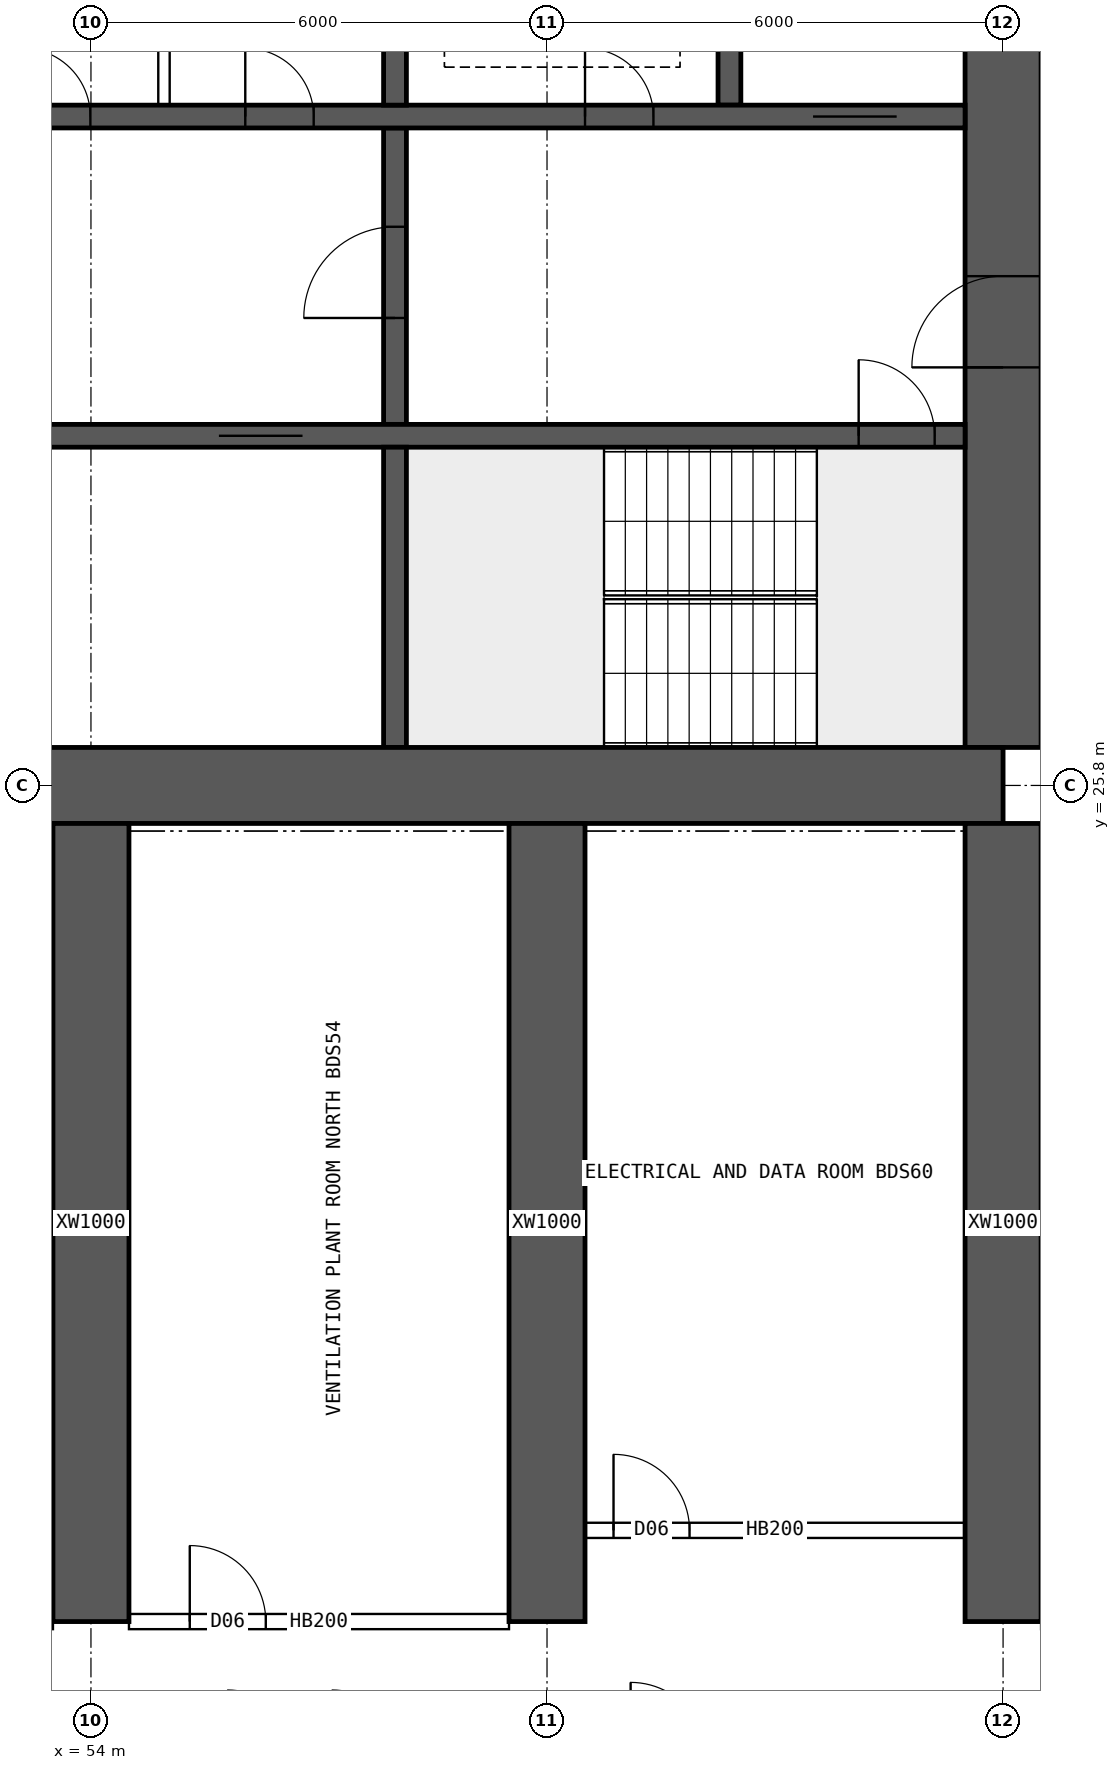
"""IFC4 building model, lengths in metres.
Left out: names, types, materials, properties, quantities, classifications, styles, units other than length and angle.
Written with IfcOpenShell. Run it as: python <this file> out.ifc"""

import sys

from ifc_helpers import new_model, si_unit, direction, frame, frame_2d, origin, place, context, subcontext, project, spatial, rectangle, extrude, element, fill, save


model = new_model("IFC4")
c1 = context("Model", 3, precision=1e-05, world=origin(), true_north=direction((0.0, 1.0)))
c2 = subcontext(c1, "Body", "Model", "MODEL_VIEW")
j1 = project(units=[si_unit("LENGTHUNIT", "METRE"), si_unit("PLANEANGLEUNIT", "RADIAN")], contexts=[c1])
p1 = place(None, origin())
s1 = spatial("IfcSite", under=j1, at=p1, CompositionType="ELEMENT")
p2 = place(p1, origin())
s2 = spatial("IfcBuilding", under=s1, at=p2, CompositionType="ELEMENT")
p3 = place(p2, frame((0.0, 0.0, 46.45)))
s3 = spatial("IfcBuildingStorey", under=s2, at=p3, CompositionType="ELEMENT", Elevation=46.45)
p4 = place(p3, frame((18.0, 25.8, 0.0), z_axis=(0.0, 0.0, 1.0), x_axis=(1.0, 0.0, 0.0)))
e1 = element("IfcWall", 1, at=p4, inside=s3, PredefinedType="SHEAR", context=c2, shape_type="SweptSolid", body=[
    extrude(rectangle(XDim=48.0, YDim=1.0, at=frame_2d((24.0, 0.0))), origin(), (0.0, 0.0, 1.0), 3.75),
])
p5 = place(p3, frame((66.0, 26.3, 0.0), z_axis=(0.0, 0.0, 1.0), x_axis=(0.0, 1.0, 0.0)))
e2 = element("IfcWall", 2, at=p5, inside=s3, PredefinedType="SHEAR", context=c2, shape_type="SweptSolid", body=[
    extrude(rectangle(XDim=11.4, YDim=1.0, at=frame_2d((5.7, 0.0))), origin(), (0.0, 0.0, 1.0), 3.75),
])
p6 = place(p5, frame((5.0, 0.0, 0.0)))
e3 = element("IfcOpeningElement", 3, at=p6, cuts=e2, PredefinedType="OPENING", context=c2, shape_type="SweptSolid", body=[
    extrude(rectangle(XDim=1.2, YDim=2.1, at=frame_2d((0.6, 1.05))), frame((0.0, 0.51, 0.0), z_axis=(0.0, -1.0, 0.0), x_axis=(1.0, 0.0, 0.0)), (0.0, 0.0, 1.0), 1.02),
])
p7 = place(p3, frame((18.5, 30.4, 0.0), z_axis=(0.0, 0.0, 1.0), x_axis=(1.0, 0.0, 0.0)))
e4 = element("IfcWall", 4, at=p7, inside=s3, PredefinedType="SHEAR", context=c2, shape_type="SweptSolid", body=[
    extrude(rectangle(XDim=47.0, YDim=0.3, at=frame_2d((23.5, 0.0))), origin(), (0.0, 0.0, 1.0), 3.75),
])
p8 = place(p7, frame((0.4, 0.0, 0.0)))
e5 = element("IfcOpeningElement", 5, at=p8, cuts=e4, PredefinedType="OPENING", context=c2, shape_type="SweptSolid", body=[
    extrude(rectangle(XDim=1.0, YDim=2.1, at=frame_2d((0.5, 1.05))), frame((0.0, 0.16, 0.0), z_axis=(0.0, -1.0, 0.0), x_axis=(1.0, 0.0, 0.0)), (0.0, 0.0, 1.0), 0.32),
])
p9 = place(p7, frame((45.6, 0.0, 0.0)))
e6 = element("IfcOpeningElement", 6, at=p9, cuts=e4, PredefinedType="OPENING", context=c2, shape_type="SweptSolid", body=[
    extrude(rectangle(XDim=1.0, YDim=2.1, at=frame_2d((0.5, 1.05))), frame((0.0, 0.16, 0.0), z_axis=(0.0, -1.0, 0.0), x_axis=(1.0, 0.0, 0.0)), (0.0, 0.0, 1.0), 0.32),
])
p10 = place(p7, frame((8.25, 0.0, 0.0)))
e7 = element("IfcOpeningElement", 7, at=p10, cuts=e4, PredefinedType="OPENING", context=c2, shape_type="SweptSolid", body=[
    extrude(rectangle(XDim=1.1, YDim=2.1, at=frame_2d((0.55, 1.05))), frame((0.0, 0.16, 0.0), z_axis=(0.0, -1.0, 0.0), x_axis=(1.0, 0.0, 0.0)), (0.0, 0.0, 1.0), 0.32),
])
p11 = place(p7, frame((10.85, 0.0, 0.0)))
e8 = element("IfcOpeningElement", 8, at=p11, cuts=e4, PredefinedType="OPENING", context=c2, shape_type="SweptSolid", body=[
    extrude(rectangle(XDim=1.1, YDim=2.1, at=frame_2d((0.55, 1.05))), frame((0.0, 0.16, 0.0), z_axis=(0.0, -1.0, 0.0), x_axis=(1.0, 0.0, 0.0)), (0.0, 0.0, 1.0), 0.32),
])
p12 = place(p7, frame((13.45, 0.0, 0.0)))
e9 = element("IfcOpeningElement", 9, at=p12, cuts=e4, PredefinedType="OPENING", context=c2, shape_type="SweptSolid", body=[
    extrude(rectangle(XDim=1.1, YDim=2.1, at=frame_2d((0.55, 1.05))), frame((0.0, 0.16, 0.0), z_axis=(0.0, -1.0, 0.0), x_axis=(1.0, 0.0, 0.0)), (0.0, 0.0, 1.0), 0.32),
])
p13 = place(p7, frame((16.05, 0.0, 0.0)))
e10 = element("IfcOpeningElement", 10, at=p13, cuts=e4, PredefinedType="OPENING", context=c2, shape_type="SweptSolid", body=[
    extrude(rectangle(XDim=1.1, YDim=2.1, at=frame_2d((0.55, 1.05))), frame((0.0, 0.16, 0.0), z_axis=(0.0, -1.0, 0.0), x_axis=(1.0, 0.0, 0.0)), (0.0, 0.0, 1.0), 0.32),
])
p14 = place(p7, frame((30.117, 0.0, 0.0)))
e11 = element("IfcOpeningElement", 11, at=p14, cuts=e4, PredefinedType="OPENING", context=c2, shape_type="SweptSolid", body=[
    extrude(rectangle(XDim=1.1, YDim=2.1, at=frame_2d((0.55, 1.05))), frame((0.0, 0.16, 0.0), z_axis=(0.0, -1.0, 0.0), x_axis=(1.0, 0.0, 0.0)), (0.0, 0.0, 1.0), 0.32),
])
p15 = place(p7, frame((33.65, 0.0, 0.0)))
e12 = element("IfcOpeningElement", 12, at=p15, cuts=e4, PredefinedType="OPENING", context=c2, shape_type="SweptSolid", body=[
    extrude(rectangle(XDim=1.1, YDim=2.1, at=frame_2d((0.55, 1.05))), frame((0.0, 0.16, 0.0), z_axis=(0.0, -1.0, 0.0), x_axis=(1.0, 0.0, 0.0)), (0.0, 0.0, 1.0), 0.32),
])
p16 = place(p7, frame((37.183, 0.0, 0.0)))
e13 = element("IfcOpeningElement", 13, at=p16, cuts=e4, PredefinedType="OPENING", context=c2, shape_type="SweptSolid", body=[
    extrude(rectangle(XDim=1.1, YDim=2.1, at=frame_2d((0.55, 1.05))), frame((0.0, 0.16, 0.0), z_axis=(0.0, -1.0, 0.0), x_axis=(1.0, 0.0, 0.0)), (0.0, 0.0, 1.0), 0.32),
])
p17 = place(p3, frame((18.5, 34.6, 0.0), z_axis=(0.0, 0.0, 1.0), x_axis=(1.0, 0.0, 0.0)))
e14 = element("IfcWall", 14, at=p17, inside=s3, PredefinedType="SHEAR", context=c2, shape_type="SweptSolid", body=[
    extrude(rectangle(XDim=47.0, YDim=0.3, at=frame_2d((23.5, 0.0))), origin(), (0.0, 0.0, 1.0), 3.75),
])
p18 = place(p17, frame((0.9, 0.0, 0.0)))
e15 = element("IfcOpeningElement", 15, at=p18, cuts=e14, PredefinedType="OPENING", context=c2, shape_type="SweptSolid", body=[
    extrude(rectangle(XDim=1.1, YDim=2.1, at=frame_2d((0.55, 1.05))), frame((0.0, 0.16, 0.0), z_axis=(0.0, -1.0, 0.0), x_axis=(1.0, 0.0, 0.0)), (0.0, 0.0, 1.0), 0.32),
])
p19 = place(p17, frame((45.0, 0.0, 0.0)))
e16 = element("IfcOpeningElement", 16, at=p19, cuts=e14, PredefinedType="OPENING", context=c2, shape_type="SweptSolid", body=[
    extrude(rectangle(XDim=1.1, YDim=2.1, at=frame_2d((0.55, 1.05))), frame((0.0, 0.16, 0.0), z_axis=(0.0, -1.0, 0.0), x_axis=(1.0, 0.0, 0.0)), (0.0, 0.0, 1.0), 0.32),
])
p20 = place(p17, frame((4.1, 0.0, 0.0)))
e17 = element("IfcOpeningElement", 17, at=p20, cuts=e14, PredefinedType="OPENING", context=c2, shape_type="SweptSolid", body=[
    extrude(rectangle(XDim=0.9, YDim=2.1, at=frame_2d((0.45, 1.05))), frame((0.0, 0.16, 0.0), z_axis=(0.0, -1.0, 0.0), x_axis=(1.0, 0.0, 0.0)), (0.0, 0.0, 1.0), 0.32),
])
p21 = place(p17, frame((42.0, 0.0, 0.0)))
e18 = element("IfcOpeningElement", 18, at=p21, cuts=e14, PredefinedType="OPENING", context=c2, shape_type="SweptSolid", body=[
    extrude(rectangle(XDim=0.9, YDim=2.1, at=frame_2d((0.45, 1.05))), frame((0.0, 0.16, 0.0), z_axis=(0.0, -1.0, 0.0), x_axis=(1.0, 0.0, 0.0)), (0.0, 0.0, 1.0), 0.32),
])
p22 = place(p17, frame((8.875, 0.0, 0.0)))
e19 = element("IfcOpeningElement", 19, at=p22, cuts=e14, PredefinedType="OPENING", context=c2, shape_type="SweptSolid", body=[
    extrude(rectangle(XDim=0.9, YDim=2.1, at=frame_2d((0.45, 1.05))), frame((0.0, 0.16, 0.0), z_axis=(0.0, -1.0, 0.0), x_axis=(1.0, 0.0, 0.0)), (0.0, 0.0, 1.0), 0.32),
])
p23 = place(p17, frame((12.849, 0.0, 0.0)))
e20 = element("IfcOpeningElement", 20, at=p23, cuts=e14, PredefinedType="OPENING", context=c2, shape_type="SweptSolid", body=[
    extrude(rectangle(XDim=0.9, YDim=2.1, at=frame_2d((0.45, 1.05))), frame((0.0, 0.16, 0.0), z_axis=(0.0, -1.0, 0.0), x_axis=(1.0, 0.0, 0.0)), (0.0, 0.0, 1.0), 0.32),
])
p24 = place(p17, frame((16.496, 0.0, 0.0)))
e21 = element("IfcOpeningElement", 21, at=p24, cuts=e14, PredefinedType="OPENING", context=c2, shape_type="SweptSolid", body=[
    extrude(rectangle(XDim=0.9, YDim=2.1, at=frame_2d((0.45, 1.05))), frame((0.0, 0.16, 0.0), z_axis=(0.0, -1.0, 0.0), x_axis=(1.0, 0.0, 0.0)), (0.0, 0.0, 1.0), 0.32),
])
p25 = place(p17, frame((20.255, 0.0, 0.0)))
e22 = element("IfcOpeningElement", 22, at=p25, cuts=e14, PredefinedType="OPENING", context=c2, shape_type="SweptSolid", body=[
    extrude(rectangle(XDim=0.9, YDim=2.1, at=frame_2d((0.45, 1.05))), frame((0.0, 0.16, 0.0), z_axis=(0.0, -1.0, 0.0), x_axis=(1.0, 0.0, 0.0)), (0.0, 0.0, 1.0), 0.32),
])
p26 = place(p17, frame((24.661, 0.0, 0.0)))
e23 = element("IfcOpeningElement", 23, at=p26, cuts=e14, PredefinedType="OPENING", context=c2, shape_type="SweptSolid", body=[
    extrude(rectangle(XDim=0.9, YDim=2.1, at=frame_2d((0.45, 1.05))), frame((0.0, 0.16, 0.0), z_axis=(0.0, -1.0, 0.0), x_axis=(1.0, 0.0, 0.0)), (0.0, 0.0, 1.0), 0.32),
])
p27 = place(p17, frame((27.458, 0.0, 0.0)))
e24 = element("IfcOpeningElement", 24, at=p27, cuts=e14, PredefinedType="OPENING", context=c2, shape_type="SweptSolid", body=[
    extrude(rectangle(XDim=0.9, YDim=2.1, at=frame_2d((0.45, 1.05))), frame((0.0, 0.16, 0.0), z_axis=(0.0, -1.0, 0.0), x_axis=(1.0, 0.0, 0.0)), (0.0, 0.0, 1.0), 0.32),
])
p28 = place(p17, frame((30.641, 0.0, 0.0)))
e25 = element("IfcOpeningElement", 25, at=p28, cuts=e14, PredefinedType="OPENING", context=c2, shape_type="SweptSolid", body=[
    extrude(rectangle(XDim=0.9, YDim=2.1, at=frame_2d((0.45, 1.05))), frame((0.0, 0.16, 0.0), z_axis=(0.0, -1.0, 0.0), x_axis=(1.0, 0.0, 0.0)), (0.0, 0.0, 1.0), 0.32),
])
p29 = place(p17, frame((34.592, 0.0, 0.0)))
e26 = element("IfcOpeningElement", 26, at=p29, cuts=e14, PredefinedType="OPENING", context=c2, shape_type="SweptSolid", body=[
    extrude(rectangle(XDim=0.9, YDim=2.1, at=frame_2d((0.45, 1.05))), frame((0.0, 0.16, 0.0), z_axis=(0.0, -1.0, 0.0), x_axis=(1.0, 0.0, 0.0)), (0.0, 0.0, 1.0), 0.32),
])
p30 = place(p17, frame((37.53, 0.0, 0.0)))
e27 = element("IfcOpeningElement", 27, at=p30, cuts=e14, PredefinedType="OPENING", context=c2, shape_type="SweptSolid", body=[
    extrude(rectangle(XDim=0.9, YDim=2.1, at=frame_2d((0.45, 1.05))), frame((0.0, 0.16, 0.0), z_axis=(0.0, -1.0, 0.0), x_axis=(1.0, 0.0, 0.0)), (0.0, 0.0, 1.0), 0.32),
])
p31 = place(p3, frame((58.0, 26.3, 0.0), z_axis=(0.0, 0.0, 1.0), x_axis=(0.0, 1.0, 0.0)))
e28 = element("IfcWall", 28, at=p31, inside=s3, PredefinedType="SHEAR", context=c2, shape_type="SweptSolid", body=[
    extrude(rectangle(XDim=3.95, YDim=0.3, at=frame_2d((1.975, 0.0))), origin(), (0.0, 0.0, 1.0), 3.75),
])
p32 = place(p3, frame((58.0, 30.55, 0.0), z_axis=(0.0, 0.0, 1.0), x_axis=(0.0, 1.0, 0.0)))
e29 = element("IfcWall", 29, at=p32, inside=s3, PredefinedType="SHEAR", context=c2, shape_type="SweptSolid", body=[
    extrude(rectangle(XDim=3.9, YDim=0.3, at=frame_2d((1.95, 0.0))), origin(), (0.0, 0.0, 1.0), 3.75),
])
p33 = place(p32, frame((1.4, 0.0, 0.0)))
e30 = element("IfcOpeningElement", 30, at=p33, cuts=e29, PredefinedType="OPENING", context=c2, shape_type="SweptSolid", body=[
    extrude(rectangle(XDim=1.2, YDim=2.1, at=frame_2d((0.6, 1.05))), frame((0.0, 0.16, 0.0), z_axis=(0.0, -1.0, 0.0), x_axis=(1.0, 0.0, 0.0)), (0.0, 0.0, 1.0), 0.32),
])
for number, where, z_axis, x_axis in (
    (31, (62.4, 34.75, 0.0), (0.0, 0.0, 1.0), (0.0, 1.0, 0.0)),
    (32, (58.0, 34.75, 0.0), (0.0, 0.0, 1.0), (0.0, 1.0, 0.0)),
):
    element("IfcWall", number, at=place(p3, frame(where, z_axis=z_axis, x_axis=x_axis)), inside=s3, PredefinedType="SHEAR", context=c2, shape_type="SweptSolid", body=[
        extrude(rectangle(XDim=2.95, YDim=0.3, at=frame_2d((1.475, 0.0))), origin(), (0.0, 0.0, 1.0), 3.75),
    ])
for number, where, z_axis, x_axis in (
    (33, (54.0, 14.8, 0.0), (0.0, 0.0, 1.0), (0.0, 1.0, 0.0)),
    (34, (60.0, 14.8, 0.0), (0.0, 0.0, 1.0), (0.0, 1.0, 0.0)),
    (35, (66.0, 14.8, 0.0), (0.0, 0.0, 1.0), (0.0, 1.0, 0.0)),
):
    element("IfcWall", number, at=place(p3, frame(where, z_axis=z_axis, x_axis=x_axis)), inside=s3, PredefinedType="SHEAR", context=c2, shape_type="SweptSolid", body=[
        extrude(rectangle(XDim=10.5, YDim=1.0, at=frame_2d((5.25, 0.0))), origin(), (0.0, 0.0, 1.0), 3.75),
    ])
p34 = place(p3, frame((54.961, 34.75, 0.0), z_axis=(0.0, 0.0, 1.0), x_axis=(0.0, 1.0, 0.0)))
e36 = element("IfcWall", 36, at=p34, inside=s3, PredefinedType="SOLIDWALL", context=c2, shape_type="SweptSolid", body=[
    extrude(rectangle(XDim=2.95, YDim=0.15, at=frame_2d((1.475, 0.0))), origin(), (0.0, 0.0, 1.0), 3.5),
])
p35 = place(p3, frame((54.5, 14.8, 0.0), z_axis=(0.0, 0.0, 1.0), x_axis=(1.0, 0.0, 0.0)))
e37 = element("IfcWall", 37, at=p35, inside=s3, PredefinedType="SOLIDWALL", context=c2, shape_type="SweptSolid", body=[
    extrude(rectangle(XDim=5.0, YDim=0.2, at=frame_2d((2.5, 0.0))), origin(), (0.0, 0.0, 1.0), 3.5),
])
p36 = place(p35, frame((0.8, 0.0, 0.0)))
e38 = element("IfcOpeningElement", 38, at=p36, cuts=e37, PredefinedType="OPENING", context=c2, shape_type="SweptSolid", body=[
    extrude(rectangle(XDim=1.0, YDim=2.1, at=frame_2d((0.5, 1.05))), frame((0.0, 0.11, 0.0), z_axis=(0.0, -1.0, 0.0), x_axis=(1.0, 0.0, 0.0)), (0.0, 0.0, 1.0), 0.22),
])
p37 = place(p3, frame((60.5, 16.0, 0.0), z_axis=(0.0, 0.0, 1.0), x_axis=(1.0, 0.0, 0.0)))
e39 = element("IfcWall", 39, at=p37, inside=s3, PredefinedType="SOLIDWALL", context=c2, shape_type="SweptSolid", body=[
    extrude(rectangle(XDim=5.0, YDim=0.2, at=frame_2d((2.5, 0.0))), origin(), (0.0, 0.0, 1.0), 3.5),
])
p38 = place(p37, frame((0.375, 0.0, 0.0)))
e40 = element("IfcOpeningElement", 40, at=p38, cuts=e39, PredefinedType="OPENING", context=c2, shape_type="SweptSolid", body=[
    extrude(rectangle(XDim=1.0, YDim=2.1, at=frame_2d((0.5, 1.05))), frame((0.0, 0.11, 0.0), z_axis=(0.0, -1.0, 0.0), x_axis=(1.0, 0.0, 0.0)), (0.0, 0.0, 1.0), 0.22),
])
p39 = place(p6, origin())
e41 = element("IfcDoor", 41, at=p39, inside=s3, OperationType="SINGLE_SWING_LEFT", PredefinedType="DOOR", context=c2, shape_type="SweptSolid", body=[
    extrude(rectangle(XDim=1.2, YDim=2.1, at=frame_2d((0.6, 1.05))), frame((0.0, 0.025, 0.0), z_axis=(0.0, -1.0, 0.0), x_axis=(1.0, 0.0, 0.0)), (0.0, 0.0, 1.0), 0.05),
])
fill(e3, e41)
p40 = place(p9, origin())
e42 = element("IfcDoor", 42, at=p40, inside=s3, OperationType="SINGLE_SWING_LEFT", PredefinedType="DOOR", context=c2, shape_type="SweptSolid", body=[
    extrude(rectangle(XDim=1.0, YDim=2.1, at=frame_2d((0.5, 1.05))), frame((0.0, 0.025, 0.0), z_axis=(0.0, -1.0, 0.0), x_axis=(1.0, 0.0, 0.0)), (0.0, 0.0, 1.0), 0.05),
])
fill(e6, e42)
p41 = place(p19, origin())
e43 = element("IfcDoor", 43, at=p41, inside=s3, OperationType="DOUBLE_DOOR_SLIDING", PredefinedType="DOOR", context=c2, shape_type="SweptSolid", body=[
    extrude(rectangle(XDim=1.1, YDim=2.1, at=frame_2d((0.55, 1.05))), frame((0.0, 0.025, 0.0), z_axis=(0.0, -1.0, 0.0), x_axis=(1.0, 0.0, 0.0)), (0.0, 0.0, 1.0), 0.05),
])
fill(e16, e43)
p42 = place(p21, origin())
e44 = element("IfcDoor", 44, at=p42, inside=s3, OperationType="SINGLE_SWING_LEFT", PredefinedType="DOOR", context=c2, shape_type="SweptSolid", body=[
    extrude(rectangle(XDim=0.9, YDim=2.1, at=frame_2d((0.45, 1.05))), frame((0.0, 0.025, 0.0), z_axis=(0.0, -1.0, 0.0), x_axis=(1.0, 0.0, 0.0)), (0.0, 0.0, 1.0), 0.05),
])
fill(e18, e44)
p43 = place(p33, origin())
e45 = element("IfcDoor", 45, at=p43, inside=s3, OperationType="SINGLE_SWING_LEFT", PredefinedType="DOOR", context=c2, shape_type="SweptSolid", body=[
    extrude(rectangle(XDim=1.2, YDim=2.1, at=frame_2d((0.6, 1.05))), frame((0.0, 0.025, 0.0), z_axis=(0.0, -1.0, 0.0), x_axis=(1.0, 0.0, 0.0)), (0.0, 0.0, 1.0), 0.05),
])
fill(e30, e45)
p44 = place(p29, origin())
e46 = element("IfcDoor", 46, at=p44, inside=s3, OperationType="SINGLE_SWING_LEFT", PredefinedType="DOOR", context=c2, shape_type="SweptSolid", body=[
    extrude(rectangle(XDim=0.9, YDim=2.1, at=frame_2d((0.45, 1.05))), frame((0.0, 0.025, 0.0), z_axis=(0.0, -1.0, 0.0), x_axis=(1.0, 0.0, 0.0)), (0.0, 0.0, 1.0), 0.05),
])
fill(e26, e46)
p45 = place(p30, origin())
e47 = element("IfcDoor", 47, at=p45, inside=s3, OperationType="SINGLE_SWING_LEFT", PredefinedType="DOOR", context=c2, shape_type="SweptSolid", body=[
    extrude(rectangle(XDim=0.9, YDim=2.1, at=frame_2d((0.45, 1.05))), frame((0.0, 0.025, 0.0), z_axis=(0.0, -1.0, 0.0), x_axis=(1.0, 0.0, 0.0)), (0.0, 0.0, 1.0), 0.05),
])
fill(e27, e47)
p46 = place(p16, origin())
e48 = element("IfcDoor", 48, at=p46, inside=s3, OperationType="DOUBLE_DOOR_SLIDING", PredefinedType="DOOR", context=c2, shape_type="SweptSolid", body=[
    extrude(rectangle(XDim=1.1, YDim=2.1, at=frame_2d((0.55, 1.05))), frame((0.0, 0.025, 0.0), z_axis=(0.0, -1.0, 0.0), x_axis=(1.0, 0.0, 0.0)), (0.0, 0.0, 1.0), 0.05),
])
fill(e13, e48)
p47 = place(p36, origin())
e49 = element("IfcDoor", 49, at=p47, inside=s3, OperationType="SINGLE_SWING_LEFT", PredefinedType="DOOR", context=c2, shape_type="SweptSolid", body=[
    extrude(rectangle(XDim=1.0, YDim=2.1, at=frame_2d((0.5, 1.05))), frame((0.0, 0.025, 0.0), z_axis=(0.0, -1.0, 0.0), x_axis=(1.0, 0.0, 0.0)), (0.0, 0.0, 1.0), 0.05),
])
fill(e38, e49)
p48 = place(p38, origin())
e50 = element("IfcDoor", 50, at=p48, inside=s3, OperationType="SINGLE_SWING_LEFT", PredefinedType="DOOR", context=c2, shape_type="SweptSolid", body=[
    extrude(rectangle(XDim=1.0, YDim=2.1, at=frame_2d((0.5, 1.05))), frame((0.0, 0.025, 0.0), z_axis=(0.0, -1.0, 0.0), x_axis=(1.0, 0.0, 0.0)), (0.0, 0.0, 1.0), 0.05),
])
fill(e40, e50)
save(model, sys.argv[1])
